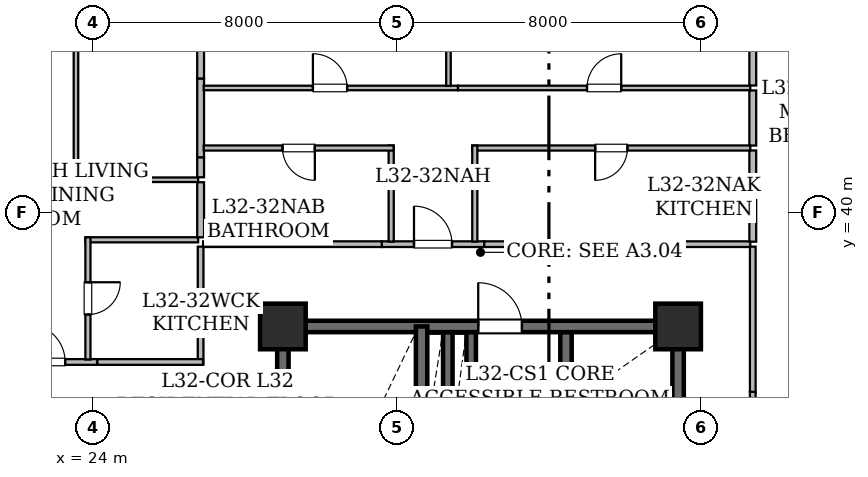
"""IFC4 building model, lengths in metres.
Left out: names, types, materials, properties, quantities, classifications, styles, units other than length and angle.
Written with IfcOpenShell. Run it as: python <this file> out.ifc"""

import sys

from ifc_helpers import new_model, si_unit, direction, frame, frame_2d, origin, origin_2d, place, context, subcontext, project, spatial, rectangle, hollow_rectangle, extrude, element, fill, save


model = new_model("IFC4")
c1 = context("Model", 3, precision=1e-05, world=origin(), true_north=direction((0.0, 1.0)))
c2 = subcontext(c1, "Body", "Model", "MODEL_VIEW")
j1 = project(units=[si_unit("LENGTHUNIT", "METRE"), si_unit("PLANEANGLEUNIT", "RADIAN")], contexts=[c1])
p1 = place(None, origin())
s1 = spatial("IfcSite", under=j1, at=p1, CompositionType="ELEMENT")
p2 = place(p1, origin())
s2 = spatial("IfcBuilding", under=s1, at=p2, CompositionType="ELEMENT")
p3 = place(p2, frame((0.0, 0.0, 127.45)))
s3 = spatial("IfcBuildingStorey", under=s2, at=p3, CompositionType="ELEMENT", Elevation=127.45)
for number, where, z_axis, x_axis in (
    (1, (29.0, 37.0, 0.0), (0.0, 0.0, 1.0), (1.0, 0.0, 0.0)),
    (2, (39.4, 37.0, 0.0), (0.0, 0.0, 1.0), (1.0, 0.0, 0.0)),
):
    element("IfcColumn", number, at=place(p3, frame(where, z_axis=z_axis, x_axis=x_axis)), inside=s3, PredefinedType="COLUMN", context=c2, shape_type="SweptSolid", body=[
        extrude(hollow_rectangle(XDim=1.2, YDim=1.2, WallThickness=0.06, at=origin_2d()), origin(), (0.0, 0.0, 1.0), 3.65),
    ])
p4 = place(p3, frame((29.0, 28.0, 0.0), z_axis=(0.0, 0.0, 1.0), x_axis=(0.0, 1.0, 0.0)))
e3 = element("IfcWall", 3, at=p4, inside=s3, PredefinedType="SHEAR", context=c2, shape_type="SweptSolid", body=[
    extrude(rectangle(XDim=9.0, YDim=0.3, at=frame_2d((4.5, 0.0))), origin(), (0.0, 0.0, 1.0), 3.43),
])
p5 = place(p3, frame((29.0, 37.0, 0.0), z_axis=(0.0, 0.0, 1.0), x_axis=(1.0, 0.0, 0.0)))
e4 = element("IfcWall", 4, at=p5, inside=s3, PredefinedType="SHEAR", context=c2, shape_type="SweptSolid", body=[
    extrude(rectangle(XDim=10.4, YDim=0.3, at=frame_2d((5.2, 0.0))), origin(), (0.0, 0.0, 1.0), 3.43),
])
p6 = place(p5, frame((5.14, 0.0, 0.0)))
e5 = element("IfcOpeningElement", 5, at=p6, cuts=e4, PredefinedType="OPENING", context=c2, shape_type="SweptSolid", body=[
    extrude(rectangle(XDim=1.15, YDim=2.2, at=frame_2d((0.575, 1.1))), frame((0.0, 0.16, 0.0), z_axis=(0.0, -1.0, 0.0), x_axis=(1.0, 0.0, 0.0)), (0.0, 0.0, 1.0), 0.32),
])
p7 = place(p3, frame((39.4, 24.4, 0.0), z_axis=(0.0, 0.0, 1.0), x_axis=(0.0, 1.0, 0.0)))
e6 = element("IfcWall", 6, at=p7, inside=s3, PredefinedType="SHEAR", context=c2, shape_type="SweptSolid", body=[
    extrude(rectangle(XDim=12.6, YDim=0.3, at=frame_2d((6.3, 0.0))), origin(), (0.0, 0.0, 1.0), 3.43),
])
p8 = place(p3, frame((32.65, 28.0, 0.0), z_axis=(0.0, 0.0, 1.0), x_axis=(0.0, 1.0, 0.0)))
e7 = element("IfcWall", 7, at=p8, inside=s3, PredefinedType="SHEAR", context=c2, shape_type="SweptSolid", body=[
    extrude(rectangle(XDim=9.0, YDim=0.3, at=frame_2d((4.5, 0.0))), origin(), (0.0, 0.0, 1.0), 3.43),
])
p9 = place(p8, frame((0.72, 0.0, 0.0)))
e8 = element("IfcOpeningElement", 8, at=p9, cuts=e7, PredefinedType="OPENING", context=c2, shape_type="SweptSolid", body=[
    extrude(rectangle(XDim=1.0, YDim=2.15, at=frame_2d((0.5, 1.075))), frame((0.0, 0.16, 0.0), z_axis=(0.0, -1.0, 0.0), x_axis=(1.0, 0.0, 0.0)), (0.0, 0.0, 1.0), 0.32),
])
p10 = place(p3, frame((36.45, 31.35, 0.0), z_axis=(0.0, 0.0, 1.0), x_axis=(0.0, 1.0, 0.0)))
e9 = element("IfcWall", 9, at=p10, inside=s3, PredefinedType="SHEAR", context=c2, shape_type="SweptSolid", body=[
    extrude(rectangle(XDim=5.496, YDim=0.3, at=frame_2d((2.748, 0.0))), origin(), (0.0, 0.0, 1.0), 3.43),
])
p11 = place(p3, frame((33.955, 34.025, 0.0), z_axis=(0.0, 0.0, 1.0), x_axis=(0.0, 1.0, 0.0)))
e10 = element("IfcWall", 10, at=p11, inside=s3, PredefinedType="SHEAR", context=c2, shape_type="SweptSolid", body=[
    extrude(rectangle(XDim=2.821, YDim=0.25, at=frame_2d((1.411, 0.0))), origin(), (0.0, 0.0, 1.0), 3.43),
])
p12 = place(p3, frame((33.34, 34.279, 0.0), z_axis=(0.0, 0.0, 1.0), x_axis=(0.0, 1.0, 0.0)))
e11 = element("IfcWall", 11, at=p12, inside=s3, PredefinedType="SHEAR", context=c2, shape_type="SweptSolid", body=[
    extrude(rectangle(XDim=2.567, YDim=0.25, at=frame_2d((1.283, 0.0))), origin(), (0.0, 0.0, 1.0), 3.43),
])
p13 = place(p3, frame((21.421, 36.065, 0.0), z_axis=(0.0, 0.0, 1.0), x_axis=(1.0, 0.0, 0.0)))
e12 = element("IfcWall", 12, at=p13, inside=s3, PredefinedType="STANDARD", context=c2, shape_type="SweptSolid", body=[
    extrude(rectangle(XDim=2.698, YDim=0.15, at=frame_2d((1.349, 0.0))), origin(), (0.0, 0.0, 1.0), 3.43),
])
p14 = place(p13, frame((0.849, 0.0, 0.0)))
e13 = element("IfcOpeningElement", 13, at=p14, cuts=e12, PredefinedType="OPENING", context=c2, shape_type="SweptSolid", body=[
    extrude(rectangle(XDim=1.0, YDim=2.15, at=frame_2d((0.5, 1.075))), frame((0.0, 0.085, 0.0), z_axis=(0.0, -1.0, 0.0), x_axis=(1.0, 0.0, 0.0)), (0.0, 0.0, 1.0), 0.17),
])
p15 = place(p3, frame((26.835, 36.0, 0.0), z_axis=(0.0, 0.0, 1.0), x_axis=(0.0, 1.0, 0.0)))
e14 = element("IfcWall", 14, at=p15, inside=s3, PredefinedType="STANDARD", context=c2, shape_type="SweptSolid", body=[
    extrude(rectangle(XDim=3.1, YDim=0.15, at=frame_2d((1.55, 0.0))), origin(), (0.0, 0.0, 1.0), 2.647),
])
p16 = place(p3, frame((24.119, 36.065, 0.0), z_axis=(0.0, 0.0, 1.0), x_axis=(1.0, 0.0, 0.0)))
e15 = element("IfcWall", 15, at=p16, inside=s3, PredefinedType="STANDARD", context=c2, shape_type="SweptSolid", body=[
    extrude(rectangle(XDim=2.779, YDim=0.15, at=frame_2d((1.39, 0.0))), origin(), (0.0, 0.0, 1.0), 3.43),
])
p17 = place(p3, frame((31.601, 39.165, 0.0), z_axis=(0.0, 0.0, 1.0), x_axis=(1.0, 0.0, 0.0)))
e16 = element("IfcWall", 16, at=p17, inside=s3, PredefinedType="STANDARD", context=c2, shape_type="SweptSolid", body=[
    extrude(rectangle(XDim=2.698, YDim=0.15, at=frame_2d((1.349, 0.0))), origin(), (0.0, 0.0, 1.0), 3.43),
])
p18 = place(p17, frame((0.849, 0.0, 0.0)))
e17 = element("IfcOpeningElement", 17, at=p18, cuts=e16, PredefinedType="OPENING", context=c2, shape_type="SweptSolid", body=[
    extrude(rectangle(XDim=1.0, YDim=2.15, at=frame_2d((0.5, 1.075))), frame((0.0, 0.085, 0.0), z_axis=(0.0, -1.0, 0.0), x_axis=(1.0, 0.0, 0.0)), (0.0, 0.0, 1.0), 0.17),
])
p19 = place(p3, frame((26.9, 39.165, 0.0), z_axis=(0.0, 0.0, 1.0), x_axis=(1.0, 0.0, 0.0)))
e18 = element("IfcWall", 18, at=p19, inside=s3, PredefinedType="STANDARD", context=c2, shape_type="SweptSolid", body=[
    extrude(rectangle(XDim=4.701, YDim=0.15, at=frame_2d((2.351, 0.0))), origin(), (0.0, 0.0, 1.0), 2.647),
])
p20 = place(p3, frame((34.299, 39.165, 0.0), z_axis=(0.0, 0.0, 1.0), x_axis=(1.0, 0.0, 0.0)))
e19 = element("IfcWall", 19, at=p20, inside=s3, PredefinedType="STANDARD", context=c2, shape_type="SweptSolid", body=[
    extrude(rectangle(XDim=7.001, YDim=0.15, at=frame_2d((3.5, 0.0))), origin(), (0.0, 0.0, 1.0), 2.647),
])
p21 = place(p3, frame((41.365, 35.279, 0.0), z_axis=(0.0, 0.0, 1.0), x_axis=(0.0, -1.0, 0.0)))
e20 = element("IfcWall", 20, at=p21, inside=s3, PredefinedType="STANDARD", context=c2, shape_type="SweptSolid", body=[
    extrude(rectangle(XDim=9.098, YDim=0.15, at=frame_2d((4.549, 0.0))), origin(), (0.0, 0.0, 1.0), 3.107),
])
p22 = place(p21, frame((4.049, 0.0, 0.0)))
e21 = element("IfcOpeningElement", 21, at=p22, cuts=e20, PredefinedType="OPENING", context=c2, shape_type="SweptSolid", body=[
    extrude(rectangle(XDim=1.0, YDim=2.15, at=frame_2d((0.5, 1.075))), frame((0.0, 0.085, 0.0), z_axis=(0.0, -1.0, 0.0), x_axis=(1.0, 0.0, 0.0)), (0.0, 0.0, 1.0), 0.17),
])
p23 = place(p3, frame((41.365, 39.1, 0.0), z_axis=(0.0, 0.0, 1.0), x_axis=(0.0, -1.0, 0.0)))
e22 = element("IfcWall", 22, at=p23, inside=s3, PredefinedType="STANDARD", context=c2, shape_type="SweptSolid", body=[
    extrude(rectangle(XDim=3.821, YDim=0.15, at=frame_2d((1.911, 0.0))), origin(), (0.0, 0.0, 1.0), 2.647),
])
p24 = place(p3, frame((26.77, 39.28, 0.0), z_axis=(0.0, 0.0, 1.0), x_axis=(-1.0, 0.0, 0.0)))
e23 = element("IfcWall", 23, at=p24, inside=s3, PredefinedType="PARTITIONING", context=c2, shape_type="SweptSolid", body=[
    extrude(rectangle(XDim=2.965, YDim=0.135, at=frame_2d((1.482, 0.0))), origin(), (0.0, 0.0, 1.0), 3.43),
])
p25 = place(p3, frame((23.87, 39.345, 0.0), z_axis=(0.0, 0.0, 1.0), x_axis=(0.0, -1.0, 0.0)))
e24 = element("IfcWall", 24, at=p25, inside=s3, PredefinedType="PARTITIONING", context=c2, shape_type="SweptSolid", body=[
    extrude(rectangle(XDim=3.215, YDim=0.135, at=frame_2d((1.607, 0.0))), origin(), (0.0, 0.0, 1.0), 2.647),
])
p26 = place(p25, frame((1.182, 0.0, 0.0)))
e25 = element("IfcOpeningElement", 25, at=p26, cuts=e24, PredefinedType="OPENING", context=c2, shape_type="SweptSolid", body=[
    extrude(rectangle(XDim=0.85, YDim=2.1, at=frame_2d((0.425, 1.05))), frame((0.0, 0.077, 0.0), z_axis=(0.0, -1.0, 0.0), x_axis=(1.0, 0.0, 0.0)), (0.0, 0.0, 1.0), 0.155),
])
p27 = place(p3, frame((23.555, 49.388, 0.0), z_axis=(0.0, 0.0, 1.0), x_axis=(0.0, -1.0, 0.0)))
e26 = element("IfcWall", 26, at=p27, inside=s3, PredefinedType="PARTITIONING", context=c2, shape_type="SweptSolid", body=[
    extrude(rectangle(XDim=8.593, YDim=0.12, at=frame_2d((4.296, 0.0))), origin(), (0.0, 0.0, 1.0), 2.876),
])
p28 = place(p27, frame((3.846, 0.0, 0.0)))
e27 = element("IfcOpeningElement", 27, at=p28, cuts=e26, PredefinedType="OPENING", context=c2, shape_type="SweptSolid", body=[
    extrude(rectangle(XDim=0.9, YDim=2.1, at=frame_2d((0.45, 1.05))), frame((0.0, 0.07, 0.0), z_axis=(0.0, -1.0, 0.0), x_axis=(1.0, 0.0, 0.0)), (0.0, 0.0, 1.0), 0.14),
])
p29 = place(p3, frame((23.49, 40.86, 0.0), z_axis=(0.0, 0.0, 1.0), x_axis=(1.0, 0.0, 0.0)))
e28 = element("IfcWall", 28, at=p29, inside=s3, PredefinedType="PARTITIONING", context=c2, shape_type="SweptSolid", body=[
    extrude(rectangle(XDim=3.28, YDim=0.12, at=frame_2d((1.64, 0.0))), origin(), (0.0, 0.0, 1.0), 3.43),
])
p30 = place(p3, frame((26.835, 40.795, 0.0), z_axis=(0.0, 0.0, 1.0), x_axis=(0.0, -1.0, 0.0)))
e29 = element("IfcWall", 29, at=p30, inside=s3, PredefinedType="STANDARD", context=c2, shape_type="SweptSolid", body=[
    extrude(rectangle(XDim=1.45, YDim=0.18, at=frame_2d((0.725, 0.0))), origin(), (0.0, 0.0, 1.0), 3.43),
])
p31 = place(p3, frame((26.835, 43.524, 0.0), z_axis=(0.0, 0.0, 1.0), x_axis=(0.0, -1.0, 0.0)))
e30 = element("IfcWall", 30, at=p31, inside=s3, PredefinedType="STANDARD", context=c2, shape_type="SweptSolid", body=[
    extrude(rectangle(XDim=2.078, YDim=0.18, at=frame_2d((1.039, 0.0))), origin(), (0.0, 0.0, 1.0), 3.43),
])
p32 = place(p3, frame((26.835, 41.446, 0.0), z_axis=(0.0, 0.0, 1.0), x_axis=(0.0, -1.0, 0.0)))
e31 = element("IfcWall", 31, at=p32, inside=s3, PredefinedType="STANDARD", context=c2, shape_type="SweptSolid", body=[
    extrude(rectangle(XDim=0.521, YDim=0.18, at=frame_2d((0.26, 0.0))), origin(), (0.0, 0.0, 1.0), 3.43),
])
p33 = place(p3, frame((26.835, 49.388, 0.0), z_axis=(0.0, 0.0, 1.0), x_axis=(0.0, -1.0, 0.0)))
e32 = element("IfcWall", 32, at=p33, inside=s3, PredefinedType="STANDARD", context=c2, shape_type="SweptSolid", body=[
    extrude(rectangle(XDim=5.864, YDim=0.18, at=frame_2d((2.932, 0.0))), origin(), (0.0, 0.0, 1.0), 2.876),
])
p34 = place(p3, frame((31.85, 39.232, 0.0), z_axis=(0.0, 0.0, 1.0), x_axis=(0.0, 1.0, 0.0)))
e33 = element("IfcWall", 33, at=p34, inside=s3, PredefinedType="PARTITIONING", context=c2, shape_type="SweptSolid", body=[
    extrude(rectangle(XDim=2.528, YDim=0.135, at=frame_2d((1.264, 0.0))), origin(), (0.0, 0.0, 1.0), 3.43),
])
p35 = place(p3, frame((31.915, 41.695, 0.0), z_axis=(0.0, 0.0, 1.0), x_axis=(-1.0, 0.0, 0.0)))
e34 = element("IfcWall", 34, at=p35, inside=s3, PredefinedType="PARTITIONING", context=c2, shape_type="SweptSolid", body=[
    extrude(rectangle(XDim=4.998, YDim=0.135, at=frame_2d((2.499, 0.0))), origin(), (0.0, 0.0, 1.0), 2.647),
])
p36 = place(p35, frame((2.074, 0.0, 0.0)))
e35 = element("IfcOpeningElement", 35, at=p36, cuts=e34, PredefinedType="OPENING", context=c2, shape_type="SweptSolid", body=[
    extrude(rectangle(XDim=0.85, YDim=2.1, at=frame_2d((0.425, 1.05))), frame((0.0, 0.077, 0.0), z_axis=(0.0, -1.0, 0.0), x_axis=(1.0, 0.0, 0.0)), (0.0, 0.0, 1.0), 0.155),
])
p37 = place(p3, frame((41.3, 41.695, 0.0), z_axis=(0.0, 0.0, 1.0), x_axis=(-1.0, 0.0, 0.0)))
e36 = element("IfcWall", 36, at=p37, inside=s3, PredefinedType="PARTITIONING", context=c2, shape_type="SweptSolid", body=[
    extrude(rectangle(XDim=7.315, YDim=0.135, at=frame_2d((3.657, 0.0))), origin(), (0.0, 0.0, 1.0), 2.647),
])
p38 = place(p37, frame((3.233, 0.0, 0.0)))
e37 = element("IfcOpeningElement", 37, at=p38, cuts=e36, PredefinedType="OPENING", context=c2, shape_type="SweptSolid", body=[
    extrude(rectangle(XDim=0.85, YDim=2.1, at=frame_2d((0.425, 1.05))), frame((0.0, 0.077, 0.0), z_axis=(0.0, -1.0, 0.0), x_axis=(1.0, 0.0, 0.0)), (0.0, 0.0, 1.0), 0.155),
])
p39 = place(p3, frame((34.05, 41.76, 0.0), z_axis=(0.0, 0.0, 1.0), x_axis=(0.0, -1.0, 0.0)))
e38 = element("IfcWall", 38, at=p39, inside=s3, PredefinedType="PARTITIONING", context=c2, shape_type="SweptSolid", body=[
    extrude(rectangle(XDim=2.528, YDim=0.135, at=frame_2d((1.264, 0.0))), origin(), (0.0, 0.0, 1.0), 3.43),
])
p40 = place(p3, frame((26.917, 43.275, 0.0), z_axis=(0.0, 0.0, 1.0), x_axis=(1.0, 0.0, 0.0)))
e39 = element("IfcWall", 39, at=p40, inside=s3, PredefinedType="PARTITIONING", context=c2, shape_type="SweptSolid", body=[
    extrude(rectangle(XDim=6.69, YDim=0.12, at=frame_2d((3.345, 0.0))), origin(), (0.0, 0.0, 1.0), 2.647),
])
p41 = place(p40, frame((2.873, 0.0, 0.0)))
e40 = element("IfcOpeningElement", 40, at=p41, cuts=e39, PredefinedType="OPENING", context=c2, shape_type="SweptSolid", body=[
    extrude(rectangle(XDim=0.9, YDim=2.1, at=frame_2d((0.45, 1.05))), frame((0.0, 0.07, 0.0), z_axis=(0.0, -1.0, 0.0), x_axis=(1.0, 0.0, 0.0)), (0.0, 0.0, 1.0), 0.14),
])
p42 = place(p3, frame((33.607, 43.275, 0.0), z_axis=(0.0, 0.0, 1.0), x_axis=(1.0, 0.0, 0.0)))
e41 = element("IfcWall", 41, at=p42, inside=s3, PredefinedType="PARTITIONING", context=c2, shape_type="SweptSolid", body=[
    extrude(rectangle(XDim=7.693, YDim=0.12, at=frame_2d((3.847, 0.0))), origin(), (0.0, 0.0, 1.0), 2.647),
])
p43 = place(p42, frame((3.396, 0.0, 0.0)))
e42 = element("IfcOpeningElement", 42, at=p43, cuts=e41, PredefinedType="OPENING", context=c2, shape_type="SweptSolid", body=[
    extrude(rectangle(XDim=0.9, YDim=2.1, at=frame_2d((0.45, 1.05))), frame((0.0, 0.07, 0.0), z_axis=(0.0, -1.0, 0.0), x_axis=(1.0, 0.0, 0.0)), (0.0, 0.0, 1.0), 0.14),
])
p44 = place(p3, frame((41.365, 43.21, 0.0), z_axis=(0.0, 0.0, 1.0), x_axis=(0.0, -1.0, 0.0)))
e43 = element("IfcWall", 43, at=p44, inside=s3, PredefinedType="STANDARD", context=c2, shape_type="SweptSolid", body=[
    extrude(rectangle(XDim=1.45, YDim=0.18, at=frame_2d((0.725, 0.0))), origin(), (0.0, 0.0, 1.0), 3.43),
])
p45 = place(p3, frame((41.365, 41.63, 0.0), z_axis=(0.0, 0.0, 1.0), x_axis=(0.0, -1.0, 0.0)))
e44 = element("IfcWall", 44, at=p45, inside=s3, PredefinedType="STANDARD", context=c2, shape_type="SweptSolid", body=[
    extrude(rectangle(XDim=2.4, YDim=0.18, at=frame_2d((1.2, 0.0))), origin(), (0.0, 0.0, 1.0), 3.43),
])
p46 = place(p3, frame((33.357, 49.388, 0.0), z_axis=(0.0, 0.0, 1.0), x_axis=(0.0, -1.0, 0.0)))
e45 = element("IfcWall", 45, at=p46, inside=s3, PredefinedType="PARTITIONING", context=c2, shape_type="SweptSolid", body=[
    extrude(rectangle(XDim=6.059, YDim=0.12, at=frame_2d((3.029, 0.0))), origin(), (0.0, 0.0, 1.0), 2.876),
])
p47 = place(p3, frame((41.365, 49.388, 0.0), z_axis=(0.0, 0.0, 1.0), x_axis=(0.0, -1.0, 0.0)))
e46 = element("IfcWall", 46, at=p47, inside=s3, PredefinedType="STANDARD", context=c2, shape_type="SweptSolid", body=[
    extrude(rectangle(XDim=6.048, YDim=0.18, at=frame_2d((3.024, 0.0))), origin(), (0.0, 0.0, 1.0), 2.876),
])
p48 = place(p6, origin())
e47 = element("IfcDoor", 47, at=p48, inside=s3, OperationType="SINGLE_SWING_LEFT", PredefinedType="DOOR", context=c2, shape_type="SweptSolid", body=[
    extrude(rectangle(XDim=1.15, YDim=2.2, at=frame_2d((0.575, 1.1))), frame((0.0, 0.025, 0.0), z_axis=(0.0, -1.0, 0.0), x_axis=(1.0, 0.0, 0.0)), (0.0, 0.0, 1.0), 0.05),
])
fill(e5, e47)
p49 = place(p14, origin())
e48 = element("IfcDoor", 48, at=p49, inside=s3, OperationType="SINGLE_SWING_LEFT", PredefinedType="DOOR", context=c2, shape_type="SweptSolid", body=[
    extrude(rectangle(XDim=1.0, YDim=2.15, at=frame_2d((0.5, 1.075))), frame((0.0, 0.025, 0.0), z_axis=(0.0, -1.0, 0.0), x_axis=(1.0, 0.0, 0.0)), (0.0, 0.0, 1.0), 0.05),
])
fill(e13, e48)
p50 = place(p18, origin())
e49 = element("IfcDoor", 49, at=p50, inside=s3, OperationType="SINGLE_SWING_LEFT", PredefinedType="DOOR", context=c2, shape_type="SweptSolid", body=[
    extrude(rectangle(XDim=1.0, YDim=2.15, at=frame_2d((0.5, 1.075))), frame((0.0, 0.025, 0.0), z_axis=(0.0, -1.0, 0.0), x_axis=(1.0, 0.0, 0.0)), (0.0, 0.0, 1.0), 0.05),
])
fill(e17, e49)
p51 = place(p26, origin())
e50 = element("IfcDoor", 50, at=p51, inside=s3, OperationType="SINGLE_SWING_LEFT", PredefinedType="DOOR", context=c2, shape_type="SweptSolid", body=[
    extrude(rectangle(XDim=0.85, YDim=2.1, at=frame_2d((0.425, 1.05))), frame((0.0, 0.025, 0.0), z_axis=(0.0, -1.0, 0.0), x_axis=(1.0, 0.0, 0.0)), (0.0, 0.0, 1.0), 0.05),
])
fill(e25, e50)
p52 = place(p36, origin())
e51 = element("IfcDoor", 51, at=p52, inside=s3, OperationType="SINGLE_SWING_LEFT", PredefinedType="DOOR", context=c2, shape_type="SweptSolid", body=[
    extrude(rectangle(XDim=0.85, YDim=2.1, at=frame_2d((0.425, 1.05))), frame((0.0, 0.025, 0.0), z_axis=(0.0, -1.0, 0.0), x_axis=(1.0, 0.0, 0.0)), (0.0, 0.0, 1.0), 0.05),
])
fill(e35, e51)
p53 = place(p38, origin())
e52 = element("IfcDoor", 52, at=p53, inside=s3, OperationType="SINGLE_SWING_RIGHT", PredefinedType="DOOR", context=c2, shape_type="SweptSolid", body=[
    extrude(rectangle(XDim=0.85, YDim=2.1, at=frame_2d((0.425, 1.05))), frame((0.0, 0.025, 0.0), z_axis=(0.0, -1.0, 0.0), x_axis=(1.0, 0.0, 0.0)), (0.0, 0.0, 1.0), 0.05),
])
fill(e37, e52)
p54 = place(p41, origin())
e53 = element("IfcDoor", 53, at=p54, inside=s3, OperationType="SINGLE_SWING_LEFT", PredefinedType="DOOR", context=c2, shape_type="SweptSolid", body=[
    extrude(rectangle(XDim=0.9, YDim=2.1, at=frame_2d((0.45, 1.05))), frame((0.0, 0.025, 0.0), z_axis=(0.0, -1.0, 0.0), x_axis=(1.0, 0.0, 0.0)), (0.0, 0.0, 1.0), 0.05),
])
fill(e40, e53)
p55 = place(p43, origin())
e54 = element("IfcDoor", 54, at=p55, inside=s3, OperationType="SINGLE_SWING_RIGHT", PredefinedType="DOOR", context=c2, shape_type="SweptSolid", body=[
    extrude(rectangle(XDim=0.9, YDim=2.1, at=frame_2d((0.45, 1.05))), frame((0.0, 0.025, 0.0), z_axis=(0.0, -1.0, 0.0), x_axis=(1.0, 0.0, 0.0)), (0.0, 0.0, 1.0), 0.05),
])
fill(e42, e54)
save(model, sys.argv[1])
